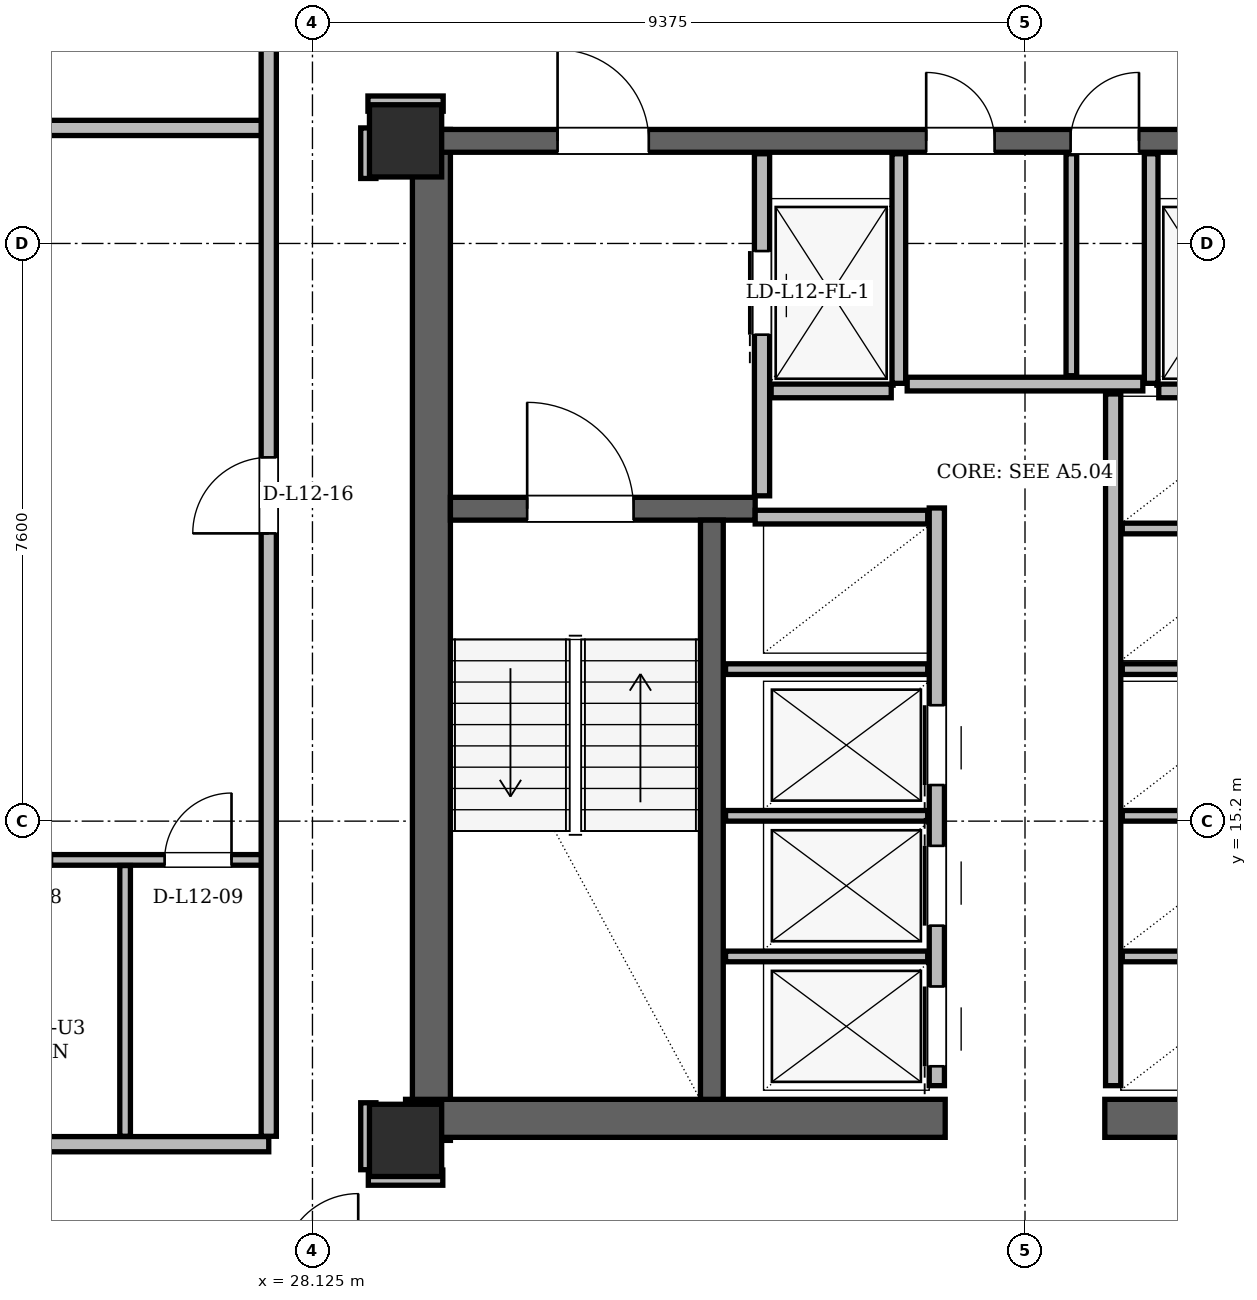
"""IFC4 building model, lengths in metres.
Left out: names, types, materials, properties, quantities, classifications, styles, units other than length and angle.
Written with IfcOpenShell. Run it as: python <this file> out.ifc"""

import sys

from ifc_helpers import new_model, si_unit, direction, frame, frame_2d, origin, origin_2d, place, context, subcontext, project, spatial, rectangle, hollow_rectangle, extrude, element, fill, save


model = new_model("IFC4")
c1 = context("Model", 3, precision=1e-05, world=origin(), true_north=direction((0.0, 1.0)))
c2 = subcontext(c1, "Body", "Model", "MODEL_VIEW")
j1 = project(units=[si_unit("LENGTHUNIT", "METRE"), si_unit("PLANEANGLEUNIT", "RADIAN")], contexts=[c1])
p1 = place(None, origin())
s1 = spatial("IfcSite", under=j1, at=p1, CompositionType="ELEMENT")
p2 = place(p1, origin())
s2 = spatial("IfcBuilding", under=s1, at=p2, CompositionType="ELEMENT")
p3 = place(p2, frame((0.0, 0.0, 48.9)))
s3 = spatial("IfcBuildingStorey", under=s2, at=p3, CompositionType="ELEMENT", Elevation=48.9)
for number, where, z_axis, x_axis in (
    (1, (29.35, 11.0, 0.0), (0.0, 0.0, 1.0), (1.0, 0.0, 0.0)),
    (2, (29.35, 24.15, 0.0), (0.0, 0.0, 1.0), (1.0, 0.0, 0.0)),
):
    element("IfcColumn", number, at=place(p3, frame(where, z_axis=z_axis, x_axis=x_axis)), inside=s3, PredefinedType="COLUMN", context=c2, shape_type="SweptSolid", body=[
        extrude(hollow_rectangle(XDim=0.95, YDim=0.95, WallThickness=0.08, at=origin_2d()), origin(), (0.0, 0.0, 1.0), 3.6),
    ])
p4 = place(p3, frame((29.69, 11.0, 0.0), z_axis=(0.0, 0.0, 1.0), x_axis=(0.0, 1.0, 0.0)))
e3 = element("IfcWall", 3, at=p4, inside=s3, PredefinedType="SHEAR", context=c2, shape_type="SweptSolid", body=[
    extrude(rectangle(XDim=13.3, YDim=0.5, at=frame_2d((6.65, 0.0))), origin(), (0.0, 0.0, 1.0), 3.36),
])
for number, where, z_axis, x_axis in (
    (4, (29.35, 11.29, 0.0), (0.0, 0.0, 1.0), (1.0, 0.0, 0.0)),
    (5, (38.55, 11.29, 0.0), (0.0, 0.0, 1.0), (1.0, 0.0, 0.0)),
):
    element("IfcWall", number, at=place(p3, frame(where, z_axis=z_axis, x_axis=x_axis)), inside=s3, PredefinedType="SHEAR", context=c2, shape_type="SweptSolid", body=[
        extrude(rectangle(XDim=7.1, YDim=0.5, at=frame_2d((3.55, 0.0))), origin(), (0.0, 0.0, 1.0), 3.36),
    ])
p5 = place(p3, frame((29.65, 24.15, 0.0), z_axis=(0.0, 0.0, 1.0), x_axis=(1.0, 0.0, 0.0)))
e6 = element("IfcWall", 6, at=p5, inside=s3, PredefinedType="SHEAR", context=c2, shape_type="SweptSolid", body=[
    extrude(rectangle(XDim=15.7, YDim=0.3, at=frame_2d((7.85, 0.0))), origin(), (0.0, 0.0, 1.0), 3.36),
])
p6 = place(p5, frame((1.7, 0.0, 0.0)))
e7 = element("IfcOpeningElement", 7, at=p6, cuts=e6, PredefinedType="OPENING", context=c2, shape_type="SweptSolid", body=[
    extrude(rectangle(XDim=1.2, YDim=2.2, at=frame_2d((0.6, 1.1))), frame((0.0, 0.15, 0.0), z_axis=(0.0, -1.0, 0.0), x_axis=(1.0, 0.0, 0.0)), (0.0, 0.0, 1.0), 0.3),
])
p7 = place(p5, frame((12.8, 0.0, 0.0)))
e8 = element("IfcOpeningElement", 8, at=p7, cuts=e6, PredefinedType="OPENING", context=c2, shape_type="SweptSolid", body=[
    extrude(rectangle(XDim=1.2, YDim=2.2, at=frame_2d((0.6, 1.1))), frame((0.0, 0.15, 0.0), z_axis=(0.0, -1.0, 0.0), x_axis=(1.0, 0.0, 0.0)), (0.0, 0.0, 1.0), 0.3),
])
p8 = place(p5, frame((6.55, 0.0, 0.0)))
e9 = element("IfcOpeningElement", 9, at=p8, cuts=e6, PredefinedType="OPENING", context=c2, shape_type="SweptSolid", body=[
    extrude(rectangle(XDim=0.9, YDim=2.05, at=frame_2d((0.45, 1.025))), frame((0.0, 0.15, 0.0), z_axis=(0.0, -1.0, 0.0), x_axis=(1.0, 0.0, 0.0)), (0.0, 0.0, 1.0), 0.3),
])
p9 = place(p5, frame((8.45, 0.0, 0.0)))
e10 = element("IfcOpeningElement", 10, at=p9, cuts=e6, PredefinedType="OPENING", context=c2, shape_type="SweptSolid", body=[
    extrude(rectangle(XDim=0.9, YDim=2.05, at=frame_2d((0.45, 1.025))), frame((0.0, 0.15, 0.0), z_axis=(0.0, -1.0, 0.0), x_axis=(1.0, 0.0, 0.0)), (0.0, 0.0, 1.0), 0.3),
])
p10 = place(p3, frame((29.94, 19.31, 0.0), z_axis=(0.0, 0.0, 1.0), x_axis=(1.0, 0.0, 0.0)))
e11 = element("IfcWall", 11, at=p10, inside=s3, PredefinedType="SHEAR", context=c2, shape_type="SweptSolid", body=[
    extrude(rectangle(XDim=4.01, YDim=0.3, at=frame_2d((2.005, 0.0))), origin(), (0.0, 0.0, 1.0), 3.36),
])
p11 = place(p10, frame((1.01, 0.0, 0.0)))
e12 = element("IfcOpeningElement", 12, at=p11, cuts=e11, PredefinedType="OPENING", context=c2, shape_type="SweptSolid", body=[
    extrude(rectangle(XDim=1.4, YDim=2.2, at=frame_2d((0.7, 1.1))), frame((0.0, 0.15, 0.0), z_axis=(0.0, -1.0, 0.0), x_axis=(1.0, 0.0, 0.0)), (0.0, 0.0, 1.0), 0.3),
])
p12 = place(p3, frame((33.38, 11.54, 0.0), z_axis=(0.0, 0.0, 1.0), x_axis=(0.0, 1.0, 0.0)))
e13 = element("IfcWall", 13, at=p12, inside=s3, PredefinedType="SHEAR", context=c2, shape_type="SweptSolid", body=[
    extrude(rectangle(XDim=7.62, YDim=0.3, at=frame_2d((3.81, 0.0))), origin(), (0.0, 0.0, 1.0), 3.36),
])
p13 = place(p3, frame((30.133, 43.584, 0.0), z_axis=(0.0, 0.0, 1.0), x_axis=(-0.499998660293, -0.866026177264, 0.0)))
e14 = element("IfcWall", 14, at=p13, inside=s3, PredefinedType="SOLIDWALL", context=c2, shape_type="SweptSolid", body=[
    extrude(rectangle(XDim=33.309, YDim=0.34, at=frame_2d((16.654, 0.0))), origin(), (0.0, 0.0, 1.0), 2.494),
])
p14 = place(p13, frame((6.159, 0.0, 0.0)))
e15 = element("IfcOpeningElement", 15, at=p14, cuts=e14, PredefinedType="OPENING", context=c2, shape_type="SweptSolid", body=[
    extrude(rectangle(XDim=1.5, YDim=2.2, at=frame_2d((0.75, 1.1))), frame((0.0, 0.17, 0.0), z_axis=(0.0, -1.0, 0.0), x_axis=(1.0, 0.0, 0.0)), (0.0, 0.0, 1.0), 0.34),
])
p15 = place(p13, frame((24.194, 0.0, 0.0)))
e16 = element("IfcOpeningElement", 16, at=p15, cuts=e14, PredefinedType="OPENING", context=c2, shape_type="SweptSolid", body=[
    extrude(rectangle(XDim=1.5, YDim=2.2, at=frame_2d((0.75, 1.1))), frame((0.0, 0.17, 0.0), z_axis=(0.0, -1.0, 0.0), x_axis=(1.0, 0.0, 0.0)), (0.0, 0.0, 1.0), 0.34),
])
p16 = place(p13, frame((29.727, 0.0, 0.85)))
e17 = element("IfcOpeningElement", 17, at=p16, cuts=e14, PredefinedType="OPENING", context=c2, shape_type="SweptSolid", body=[
    extrude(rectangle(XDim=2.2, YDim=1.534, at=frame_2d((1.1, 0.767))), frame((0.0, 0.17, 0.0), z_axis=(0.0, -1.0, 0.0), x_axis=(1.0, 0.0, 0.0)), (0.0, 0.0, 1.0), 0.34),
])
p17 = place(p13, frame((1.322, 0.0, 0.85)))
e18 = element("IfcOpeningElement", 18, at=p17, cuts=e14, PredefinedType="OPENING", context=c2, shape_type="SweptSolid", body=[
    extrude(rectangle(XDim=2.6, YDim=1.534, at=frame_2d((1.3, 0.767))), frame((0.0, 0.17, 0.0), z_axis=(0.0, -1.0, 0.0), x_axis=(1.0, 0.0, 0.0)), (0.0, 0.0, 1.0), 0.34),
])
p18 = place(p13, frame((16.823, 0.0, 0.85)))
e19 = element("IfcOpeningElement", 19, at=p18, cuts=e14, PredefinedType="OPENING", context=c2, shape_type="SweptSolid", body=[
    extrude(rectangle(XDim=2.0, YDim=1.534, at=frame_2d((1.0, 0.767))), frame((0.0, 0.17, 0.0), z_axis=(0.0, -1.0, 0.0), x_axis=(1.0, 0.0, 0.0)), (0.0, 0.0, 1.0), 0.34),
])
p19 = place(p3, frame((34.04, 19.48, 0.0), z_axis=(0.0, 0.0, 1.0), x_axis=(0.0, 1.0, 0.0)))
e20 = element("IfcWall", 20, at=p19, inside=s3, PredefinedType="PARTITIONING", context=c2, shape_type="SweptSolid", body=[
    extrude(rectangle(XDim=4.5, YDim=0.2, at=frame_2d((2.25, 0.0))), origin(), (0.0, 0.0, 1.0), 2.4),
])
p20 = place(p19, frame((2.12, 0.0, 0.0)))
e21 = element("IfcOpeningElement", 21, at=p20, cuts=e20, PredefinedType="OPENING", context=c2, shape_type="SweptSolid", body=[
    extrude(rectangle(XDim=1.1, YDim=2.2, at=frame_2d((0.55, 1.1))), frame((0.0, 0.1, 0.0), z_axis=(0.0, -1.0, 0.0), x_axis=(1.0, 0.0, 0.0)), (0.0, 0.0, 1.0), 0.2),
])
p21 = place(p3, frame((35.84, 20.96, 0.0), z_axis=(0.0, 0.0, 1.0), x_axis=(0.0, 1.0, 0.0)))
e22 = element("IfcWall", 22, at=p21, inside=s3, PredefinedType="PARTITIONING", context=c2, shape_type="SweptSolid", body=[
    extrude(rectangle(XDim=3.02, YDim=0.18, at=frame_2d((1.51, 0.0))), origin(), (0.0, 0.0, 1.0), 2.4),
])
p22 = place(p3, frame((34.16, 20.86, 0.0), z_axis=(0.0, 0.0, 1.0), x_axis=(1.0, 0.0, 0.0)))
e23 = element("IfcWall", 23, at=p22, inside=s3, PredefinedType="PARTITIONING", context=c2, shape_type="SweptSolid", body=[
    extrude(rectangle(XDim=1.58, YDim=0.18, at=frame_2d((0.79, 0.0))), origin(), (0.0, 0.0, 1.0), 3.36),
])
p23 = place(p3, frame((39.16, 20.96, 0.0), z_axis=(0.0, 0.0, 1.0), x_axis=(0.0, 1.0, 0.0)))
e24 = element("IfcWall", 24, at=p23, inside=s3, PredefinedType="PARTITIONING", context=c2, shape_type="SweptSolid", body=[
    extrude(rectangle(XDim=3.02, YDim=0.18, at=frame_2d((1.51, 0.0))), origin(), (0.0, 0.0, 1.0), 2.4),
])
p24 = place(p3, frame((39.26, 20.86, 0.0), z_axis=(0.0, 0.0, 1.0), x_axis=(1.0, 0.0, 0.0)))
e25 = element("IfcWall", 25, at=p24, inside=s3, PredefinedType="PARTITIONING", context=c2, shape_type="SweptSolid", body=[
    extrude(rectangle(XDim=1.58, YDim=0.18, at=frame_2d((0.79, 0.0))), origin(), (0.0, 0.0, 1.0), 3.36),
])
p25 = place(p3, frame((36.34, 11.72, 0.0), z_axis=(0.0, 0.0, 1.0), x_axis=(0.0, 1.0, 0.0)))
e26 = element("IfcWall", 26, at=p25, inside=s3, PredefinedType="PARTITIONING", context=c2, shape_type="SweptSolid", body=[
    extrude(rectangle(XDim=7.6, YDim=0.2, at=frame_2d((3.8, 0.0))), origin(), (0.0, 0.0, 1.0), 3.36),
])
p26 = place(p25, frame((0.255, 0.0, 0.0)))
e27 = element("IfcOpeningElement", 27, at=p26, cuts=e26, PredefinedType="OPENING", context=c2, shape_type="SweptSolid", body=[
    extrude(rectangle(XDim=1.05, YDim=2.15, at=frame_2d((0.525, 1.075))), frame((0.0, 0.1, 0.0), z_axis=(0.0, -1.0, 0.0), x_axis=(1.0, 0.0, 0.0)), (0.0, 0.0, 1.0), 0.2),
])
p27 = place(p25, frame((2.105, 0.0, 0.0)))
e28 = element("IfcOpeningElement", 28, at=p27, cuts=e26, PredefinedType="OPENING", context=c2, shape_type="SweptSolid", body=[
    extrude(rectangle(XDim=1.05, YDim=2.15, at=frame_2d((0.525, 1.075))), frame((0.0, 0.1, 0.0), z_axis=(0.0, -1.0, 0.0), x_axis=(1.0, 0.0, 0.0)), (0.0, 0.0, 1.0), 0.2),
])
p28 = place(p25, frame((3.955, 0.0, 0.0)))
e29 = element("IfcOpeningElement", 29, at=p28, cuts=e26, PredefinedType="OPENING", context=c2, shape_type="SweptSolid", body=[
    extrude(rectangle(XDim=1.05, YDim=2.15, at=frame_2d((0.525, 1.075))), frame((0.0, 0.1, 0.0), z_axis=(0.0, -1.0, 0.0), x_axis=(1.0, 0.0, 0.0)), (0.0, 0.0, 1.0), 0.2),
])
p29 = place(p3, frame((33.95, 19.2, 0.0), z_axis=(0.0, 0.0, 1.0), x_axis=(1.0, 0.0, 0.0)))
e30 = element("IfcWall", 30, at=p29, inside=s3, PredefinedType="PARTITIONING", context=c2, shape_type="SweptSolid", body=[
    extrude(rectangle(XDim=2.27, YDim=0.18, at=frame_2d((1.135, 0.0))), origin(), (0.0, 0.0, 1.0), 3.36),
])
for number, where, z_axis, x_axis in (
    (31, (33.56, 13.42, 0.0), (0.0, 0.0, 1.0), (1.0, 0.0, 0.0)),
    (32, (33.56, 15.27, 0.0), (0.0, 0.0, 1.0), (1.0, 0.0, 0.0)),
    (33, (33.56, 17.2, 0.0), (0.0, 0.0, 1.0), (1.0, 0.0, 0.0)),
):
    element("IfcWall", number, at=place(p3, frame(where, z_axis=z_axis, x_axis=x_axis)), inside=s3, PredefinedType="PARTITIONING", context=c2, shape_type="SweptSolid", body=[
        extrude(rectangle(XDim=2.66, YDim=0.14, at=frame_2d((1.33, 0.0))), origin(), (0.0, 0.0, 1.0), 3.36),
    ])
p30 = place(p3, frame((38.66, 11.72, 0.0), z_axis=(0.0, 0.0, 1.0), x_axis=(0.0, 1.0, 0.0)))
e34 = element("IfcWall", 34, at=p30, inside=s3, PredefinedType="PARTITIONING", context=c2, shape_type="SweptSolid", body=[
    extrude(rectangle(XDim=9.1, YDim=0.2, at=frame_2d((4.55, 0.0))), origin(), (0.0, 0.0, 1.0), 3.36),
])
for number, where, z_axis, x_axis in (
    (35, (38.78, 13.42, 0.0), (0.0, 0.0, 1.0), (1.0, 0.0, 0.0)),
    (36, (38.78, 15.27, 0.0), (0.0, 0.0, 1.0), (1.0, 0.0, 0.0)),
    (37, (38.78, 17.2, 0.0), (0.0, 0.0, 1.0), (1.0, 0.0, 0.0)),
    (38, (38.78, 19.05, 0.0), (0.0, 0.0, 1.0), (1.0, 0.0, 0.0)),
):
    element("IfcWall", number, at=place(p3, frame(where, z_axis=z_axis, x_axis=x_axis)), inside=s3, PredefinedType="PARTITIONING", context=c2, shape_type="SweptSolid", body=[
        extrude(rectangle(XDim=2.66, YDim=0.14, at=frame_2d((1.33, 0.0))), origin(), (0.0, 0.0, 1.0), 3.36),
    ])
p31 = place(p3, frame((35.95, 20.95, 0.0), z_axis=(0.0, 0.0, 1.0), x_axis=(1.0, 0.0, 0.0)))
e39 = element("IfcWall", 39, at=p31, inside=s3, PredefinedType="PARTITIONING", context=c2, shape_type="SweptSolid", body=[
    extrude(rectangle(XDim=3.1, YDim=0.18, at=frame_2d((1.55, 0.0))), origin(), (0.0, 0.0, 1.0), 3.36),
])
p32 = place(p3, frame((38.11, 21.06, 0.0), z_axis=(0.0, 0.0, 1.0), x_axis=(0.0, 1.0, 0.0)))
e40 = element("IfcWall", 40, at=p32, inside=s3, PredefinedType="PARTITIONING", context=c2, shape_type="SweptSolid", body=[
    extrude(rectangle(XDim=2.92, YDim=0.14, at=frame_2d((1.46, 0.0))), origin(), (0.0, 0.0, 1.0), 2.4),
])
p33 = place(p3, frame((28.86, 10.51, 0.0), z_axis=(0.0, 0.0, 1.0), x_axis=(1.0, 0.0, 0.0)))
e41 = element("IfcWall", 41, at=p33, inside=s3, PredefinedType="PARTITIONING", context=c2, shape_type="SweptSolid", body=[
    extrude(rectangle(XDim=0.98, YDim=0.2, at=frame_2d((0.49, 0.0))), origin(), (0.0, 0.0, 1.0), 2.738),
])
p34 = place(p3, frame((15.867, 10.95, 0.0), z_axis=(0.0, 0.0, 1.0), x_axis=(1.0, 0.0, 0.0)))
e42 = element("IfcWall", 42, at=p34, inside=s3, PredefinedType="PARTITIONING", context=c2, shape_type="SweptSolid", body=[
    extrude(rectangle(XDim=11.683, YDim=0.2, at=frame_2d((5.842, 0.0))), origin(), (0.0, 0.0, 1.0), 3.36),
])
p35 = place(p3, frame((13.925, 14.69, 0.0), z_axis=(0.0, 0.0, 1.0), x_axis=(1.0, 0.0, 0.0)))
e43 = element("IfcWall", 43, at=p35, inside=s3, PredefinedType="PARTITIONING", context=c2, shape_type="SweptSolid", body=[
    extrude(rectangle(XDim=13.675, YDim=0.14, at=frame_2d((6.837, 0.0))), origin(), (0.0, 0.0, 1.0), 2.946),
])
p36 = place(p35, frame((3.831, 0.0, 0.0)))
e44 = element("IfcOpeningElement", 44, at=p36, cuts=e43, PredefinedType="OPENING", context=c2, shape_type="SweptSolid", body=[
    extrude(rectangle(XDim=0.92, YDim=2.12, at=frame_2d((0.46, 1.06))), frame((0.0, 0.07, 0.0), z_axis=(0.0, -1.0, 0.0), x_axis=(1.0, 0.0, 0.0)), (0.0, 0.0, 1.0), 0.14),
])
p37 = place(p35, frame((9.822, 0.0, 0.0)))
e45 = element("IfcOpeningElement", 45, at=p37, cuts=e43, PredefinedType="OPENING", context=c2, shape_type="SweptSolid", body=[
    extrude(rectangle(XDim=0.95, YDim=2.1, at=frame_2d((0.475, 1.05))), frame((0.0, 0.07, 0.0), z_axis=(0.0, -1.0, 0.0), x_axis=(1.0, 0.0, 0.0)), (0.0, 0.0, 1.0), 0.14),
])
p38 = place(p35, frame((12.255, 0.0, 0.0)))
e46 = element("IfcOpeningElement", 46, at=p38, cuts=e43, PredefinedType="OPENING", context=c2, shape_type="SweptSolid", body=[
    extrude(rectangle(XDim=0.88, YDim=2.08, at=frame_2d((0.44, 1.04))), frame((0.0, 0.07, 0.0), z_axis=(0.0, -1.0, 0.0), x_axis=(1.0, 0.0, 0.0)), (0.0, 0.0, 1.0), 0.14),
])
p39 = place(p3, frame((19.212, 24.32, 0.0), z_axis=(0.0, 0.0, 1.0), x_axis=(1.0, 0.0, 0.0)))
e47 = element("IfcWall", 47, at=p39, inside=s3, PredefinedType="PARTITIONING", context=c2, shape_type="SweptSolid", body=[
    extrude(rectangle(XDim=8.338, YDim=0.2, at=frame_2d((4.169, 0.0))), origin(), (0.0, 0.0, 1.0), 2.494),
])
p40 = place(p3, frame((28.855, 24.64, 0.0), z_axis=(0.0, 0.0, 1.0), x_axis=(1.0, 0.0, 0.0)))
e48 = element("IfcWall", 48, at=p40, inside=s3, PredefinedType="PARTITIONING", context=c2, shape_type="SweptSolid", body=[
    extrude(rectangle(XDim=0.99, YDim=0.2, at=frame_2d((0.495, 0.0))), origin(), (0.0, 0.0, 1.0), 2.738),
])
p41 = place(p3, frame((25.66, 11.054, 0.0), z_axis=(0.0, 0.0, 1.0), x_axis=(0.0, 1.0, 0.0)))
e49 = element("IfcWall", 49, at=p41, inside=s3, PredefinedType="PARTITIONING", context=c2, shape_type="SweptSolid", body=[
    extrude(rectangle(XDim=3.562, YDim=0.14, at=frame_2d((1.781, 0.0))), origin(), (0.0, 0.0, 1.0), 2.738),
])
p42 = place(p3, frame((27.55, 11.054, 0.0), z_axis=(0.0, 0.0, 1.0), x_axis=(0.0, 1.0, 0.0)))
e50 = element("IfcWall", 50, at=p42, inside=s3, PredefinedType="PARTITIONING", context=c2, shape_type="SweptSolid", body=[
    extrude(rectangle(XDim=14.812, YDim=0.2, at=frame_2d((7.406, 0.0))), origin(), (0.0, 0.0, 1.0), 2.738),
])
p43 = place(p42, frame((7.932, 0.0, 0.0)))
e51 = element("IfcOpeningElement", 51, at=p43, cuts=e50, PredefinedType="OPENING", context=c2, shape_type="SweptSolid", body=[
    extrude(rectangle(XDim=1.0, YDim=2.18, at=frame_2d((0.5, 1.09))), frame((0.0, 0.1, 0.0), z_axis=(0.0, -1.0, 0.0), x_axis=(1.0, 0.0, 0.0)), (0.0, 0.0, 1.0), 0.2),
])
p44 = place(p3, frame((28.86, 10.614, 0.0), z_axis=(0.0, 0.0, 1.0), x_axis=(0.0, 1.0, 0.0)))
e52 = element("IfcWall", 52, at=p44, inside=s3, PredefinedType="PARTITIONING", context=c2, shape_type="SweptSolid", body=[
    extrude(rectangle(XDim=0.881, YDim=0.2, at=frame_2d((0.44, 0.0))), origin(), (0.0, 0.0, 1.0), 2.738),
])
p45 = place(p3, frame((28.86, 23.655, 0.0), z_axis=(0.0, 0.0, 1.0), x_axis=(0.0, 1.0, 0.0)))
e53 = element("IfcWall", 53, at=p45, inside=s3, PredefinedType="PARTITIONING", context=c2, shape_type="SweptSolid", body=[
    extrude(rectangle(XDim=0.665, YDim=0.2, at=frame_2d((0.333, 0.0))), origin(), (0.0, 0.0, 1.0), 3.36),
])
p46 = place(p20, origin())
e54 = element("IfcDoor", 54, at=p46, inside=s3, OperationType="SLIDING_TO_LEFT", PredefinedType="DOOR", context=c2, shape_type="SweptSolid", body=[
    extrude(rectangle(XDim=1.1, YDim=2.2, at=frame_2d((0.55, 1.1))), frame((0.0, 0.025, 0.0), z_axis=(0.0, -1.0, 0.0), x_axis=(1.0, 0.0, 0.0)), (0.0, 0.0, 1.0), 0.05),
])
fill(e21, e54)
p47 = place(p26, origin())
e55 = element("IfcDoor", 55, at=p47, inside=s3, OperationType="SLIDING_TO_LEFT", PredefinedType="DOOR", context=c2, shape_type="SweptSolid", body=[
    extrude(rectangle(XDim=1.05, YDim=2.15, at=frame_2d((0.525, 1.075))), frame((0.0, 0.025, 0.0), z_axis=(0.0, -1.0, 0.0), x_axis=(1.0, 0.0, 0.0)), (0.0, 0.0, 1.0), 0.05),
])
fill(e27, e55)
p48 = place(p27, origin())
e56 = element("IfcDoor", 56, at=p48, inside=s3, OperationType="SLIDING_TO_RIGHT", PredefinedType="DOOR", context=c2, shape_type="SweptSolid", body=[
    extrude(rectangle(XDim=1.05, YDim=2.15, at=frame_2d((0.525, 1.075))), frame((0.0, 0.025, 0.0), z_axis=(0.0, -1.0, 0.0), x_axis=(1.0, 0.0, 0.0)), (0.0, 0.0, 1.0), 0.05),
])
fill(e28, e56)
p49 = place(p28, origin())
e57 = element("IfcDoor", 57, at=p49, inside=s3, OperationType="SLIDING_TO_LEFT", PredefinedType="DOOR", context=c2, shape_type="SweptSolid", body=[
    extrude(rectangle(XDim=1.05, YDim=2.15, at=frame_2d((0.525, 1.075))), frame((0.0, 0.025, 0.0), z_axis=(0.0, -1.0, 0.0), x_axis=(1.0, 0.0, 0.0)), (0.0, 0.0, 1.0), 0.05),
])
fill(e29, e57)
p50 = place(p11, origin())
e58 = element("IfcDoor", 58, at=p50, inside=s3, OperationType="SINGLE_SWING_LEFT", PredefinedType="DOOR", context=c2, shape_type="SweptSolid", body=[
    extrude(rectangle(XDim=1.4, YDim=2.2, at=frame_2d((0.7, 1.1))), frame((0.0, 0.025, 0.0), z_axis=(0.0, -1.0, 0.0), x_axis=(1.0, 0.0, 0.0)), (0.0, 0.0, 1.0), 0.05),
])
fill(e12, e58)
p51 = place(p6, origin())
e59 = element("IfcDoor", 59, at=p51, inside=s3, OperationType="SINGLE_SWING_LEFT", PredefinedType="DOOR", context=c2, shape_type="SweptSolid", body=[
    extrude(rectangle(XDim=1.2, YDim=2.2, at=frame_2d((0.6, 1.1))), frame((0.0, 0.025, 0.0), z_axis=(0.0, -1.0, 0.0), x_axis=(1.0, 0.0, 0.0)), (0.0, 0.0, 1.0), 0.05),
])
fill(e7, e59)
p52 = place(p8, origin())
e60 = element("IfcDoor", 60, at=p52, inside=s3, OperationType="SINGLE_SWING_LEFT", PredefinedType="DOOR", context=c2, shape_type="SweptSolid", body=[
    extrude(rectangle(XDim=0.9, YDim=2.05, at=frame_2d((0.45, 1.025))), frame((0.0, 0.025, 0.0), z_axis=(0.0, -1.0, 0.0), x_axis=(1.0, 0.0, 0.0)), (0.0, 0.0, 1.0), 0.05),
])
fill(e9, e60)
p53 = place(p9, origin())
e61 = element("IfcDoor", 61, at=p53, inside=s3, OperationType="SINGLE_SWING_RIGHT", PredefinedType="DOOR", context=c2, shape_type="SweptSolid", body=[
    extrude(rectangle(XDim=0.9, YDim=2.05, at=frame_2d((0.45, 1.025))), frame((0.0, 0.025, 0.0), z_axis=(0.0, -1.0, 0.0), x_axis=(1.0, 0.0, 0.0)), (0.0, 0.0, 1.0), 0.05),
])
fill(e10, e61)
p54 = place(p38, origin())
e62 = element("IfcDoor", 62, at=p54, inside=s3, OperationType="SINGLE_SWING_RIGHT", PredefinedType="DOOR", context=c2, shape_type="SweptSolid", body=[
    extrude(rectangle(XDim=0.88, YDim=2.08, at=frame_2d((0.44, 1.04))), frame((0.0, 0.025, 0.0), z_axis=(0.0, -1.0, 0.0), x_axis=(1.0, 0.0, 0.0)), (0.0, 0.0, 1.0), 0.05),
])
fill(e46, e62)
p55 = place(p43, origin())
e63 = element("IfcDoor", 63, at=p55, inside=s3, OperationType="SINGLE_SWING_LEFT", PredefinedType="DOOR", context=c2, shape_type="SweptSolid", body=[
    extrude(rectangle(XDim=1.0, YDim=2.18, at=frame_2d((0.5, 1.09))), frame((0.0, 0.025, 0.0), z_axis=(0.0, -1.0, 0.0), x_axis=(1.0, 0.0, 0.0)), (0.0, 0.0, 1.0), 0.05),
])
fill(e51, e63)
save(model, sys.argv[1])
